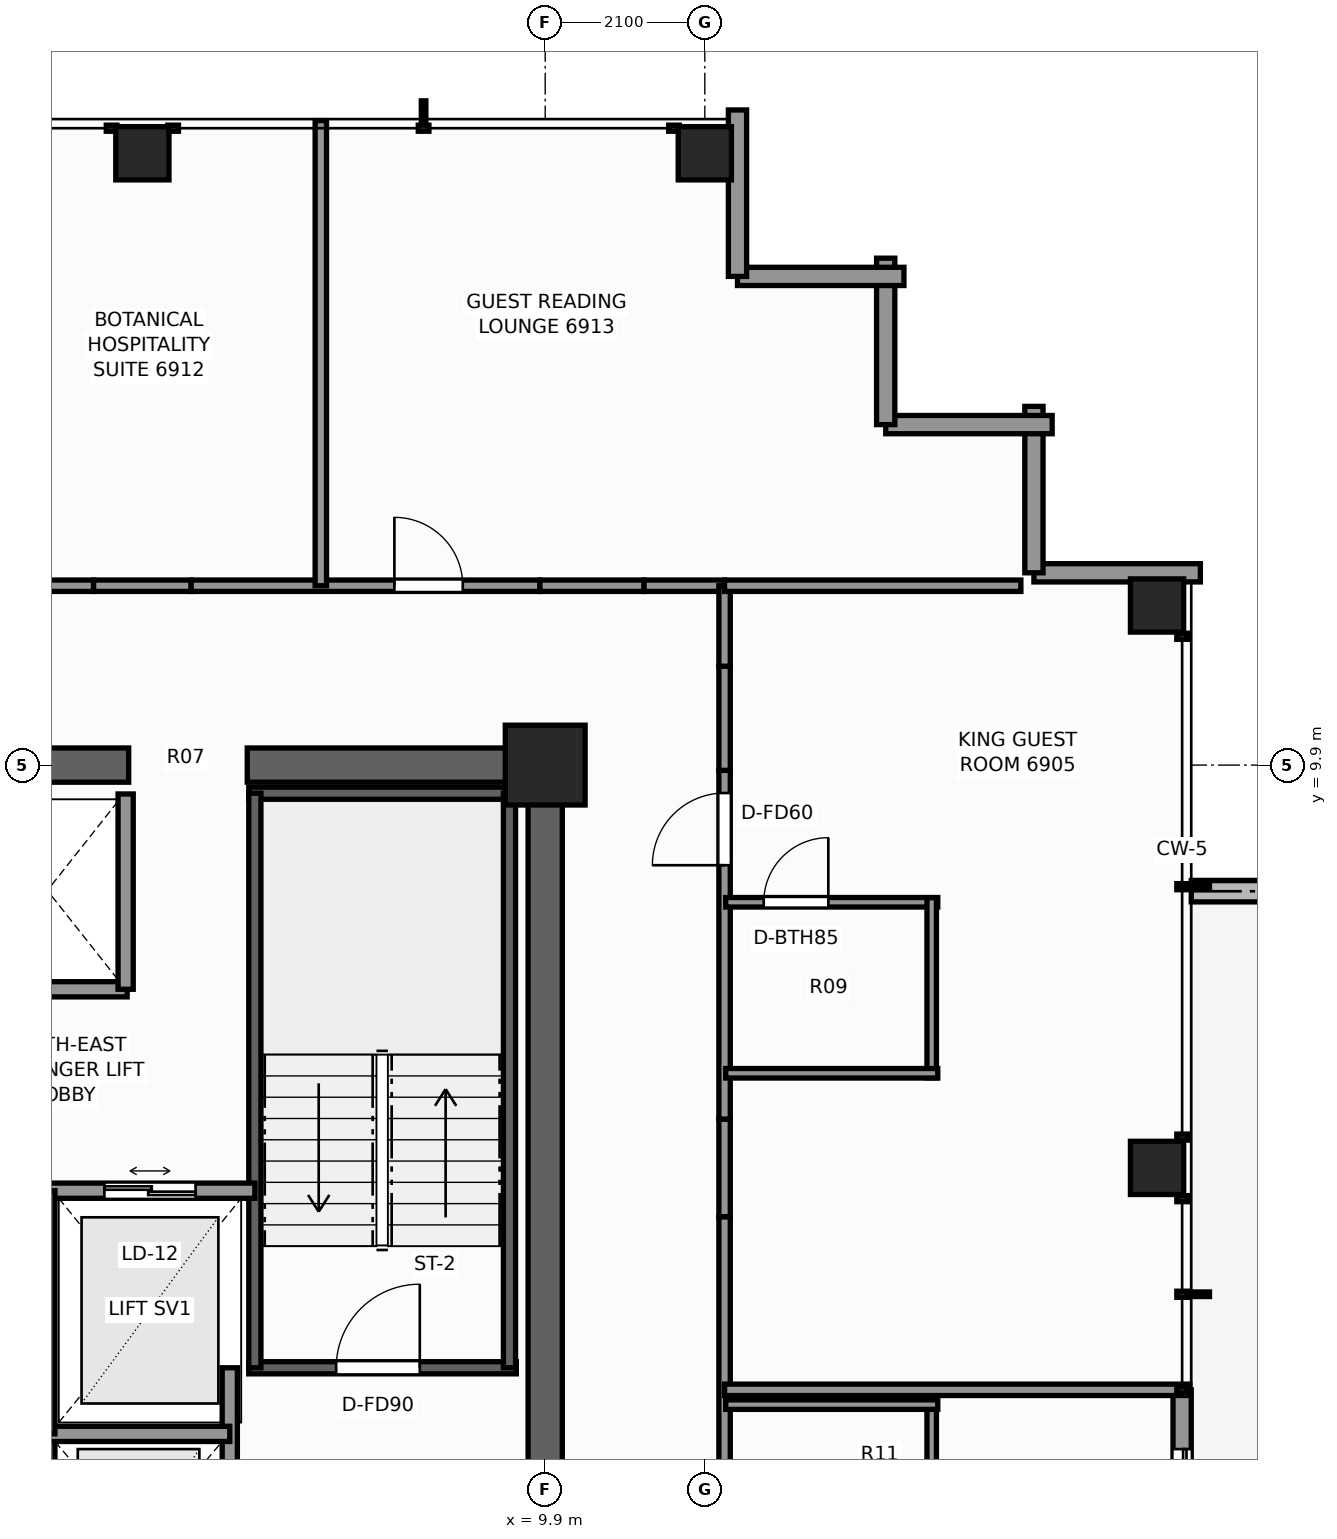
"""IFC4 building model, lengths in metres.
Left out: names, types, materials, properties, quantities, classifications, styles, units other than length and angle.
Written with IfcOpenShell. Run it as: python <this file> out.ifc"""

import sys

from ifc_helpers import new_model, si_unit, direction, frame, frame_2d, origin, origin_2d, place, context, subcontext, project, spatial, rectangle, extrude, element, fill, save


model = new_model("IFC4")
c1 = context("Model", 3, precision=1e-05, world=origin(), true_north=direction((0.0, 1.0)))
c2 = subcontext(c1, "Body", "Model", "MODEL_VIEW")
j1 = project(units=[si_unit("LENGTHUNIT", "METRE"), si_unit("PLANEANGLEUNIT", "RADIAN")], contexts=[c1])
p1 = place(None, origin())
s1 = spatial("IfcSite", under=j1, at=p1, CompositionType="ELEMENT")
p2 = place(p1, origin())
s2 = spatial("IfcBuilding", under=s1, at=p2, CompositionType="ELEMENT")
p3 = place(p2, frame((0.0, 0.0, 237.4)))
s3 = spatial("IfcBuildingStorey", under=s2, at=p3, CompositionType="ELEMENT", Elevation=237.4)
p4 = place(p3, frame((-10.125, 9.9, 0.0), z_axis=(0.0, 0.0, 1.0), x_axis=(1.0, 0.0, 0.0)))
e1 = element("IfcWall", 1, at=p4, inside=s3, PredefinedType="SHEAR", context=c2, shape_type="SweptSolid", body=[
    extrude(rectangle(XDim=14.545, YDim=0.45, at=frame_2d((7.272, 0.0))), origin(), (0.0, 0.0, 1.0), 3.5),
])
p5 = place(p3, frame((5.98, 9.9, 0.0), z_axis=(0.0, 0.0, 1.0), x_axis=(1.0, 0.0, 0.0)))
e2 = element("IfcWall", 2, at=p5, inside=s3, PredefinedType="SHEAR", context=c2, shape_type="SweptSolid", body=[
    extrude(rectangle(XDim=4.145, YDim=0.45, at=frame_2d((2.073, 0.0))), origin(), (0.0, 0.0, 1.0), 3.5),
])
p6 = place(p3, frame((9.9, -3.7, 0.0), z_axis=(0.0, 0.0, 1.0), x_axis=(0.0, 1.0, 0.0)))
e3 = element("IfcWall", 3, at=p6, inside=s3, PredefinedType="SHEAR", context=c2, shape_type="SweptSolid", body=[
    extrude(rectangle(XDim=13.375, YDim=0.45, at=frame_2d((6.688, 0.0))), origin(), (0.0, 0.0, 1.0), 3.5),
])
p7 = place(p6, frame((0.35, 0.0, 0.0)))
e4 = element("IfcOpeningElement", 4, at=p7, cuts=e3, PredefinedType="OPENING", context=c2, shape_type="SweptSolid", body=[
    extrude(rectangle(XDim=1.1, YDim=2.2, at=frame_2d((0.55, 1.1))), frame((0.0, 0.235, 0.0), z_axis=(0.0, -1.0, 0.0), x_axis=(1.0, 0.0, 0.0)), (0.0, 0.0, 1.0), 0.47),
])
p8 = place(p3, frame((9.9, 9.9, 0.0), z_axis=(0.0, 0.0, 1.0), x_axis=(1.0, 0.0, 0.0)))
e5 = element("IfcColumn", 5, at=p8, inside=s3, PredefinedType="COLUMN", context=c2, shape_type="SweptSolid", body=[
    extrude(rectangle(XDim=1.05, YDim=1.05, at=origin_2d()), origin(), (0.0, 0.0, 1.0), 3.5),
])
for number, where, z_axis, x_axis in (
    (6, (4.6, 17.95, 0.0), (0.0, 0.0, 1.0), (1.0, 0.0, 0.0)),
    (7, (12.0, 17.95, 0.0), (0.0, 0.0, 1.0), (1.0, 0.0, 0.0)),
    (8, (17.95, 4.6, 0.0), (0.0, 0.0, 1.0), (1.0, 0.0, 0.0)),
    (9, (17.95, 12.0, 0.0), (0.0, 0.0, 1.0), (1.0, 0.0, 0.0)),
):
    element("IfcColumn", number, at=place(p3, frame(where, z_axis=z_axis, x_axis=x_axis)), inside=s3, PredefinedType="COLUMN", context=c2, shape_type="SweptSolid", body=[
        extrude(rectangle(XDim=0.7, YDim=0.7, at=origin_2d()), origin(), (0.0, 0.0, 1.0), 3.5),
    ])
p9 = place(p3, frame((21.375, 8.24, -0.07), z_axis=(0.0, 0.0, 1.0), x_axis=(-1.0, 0.0, 0.0)))
e10 = element("IfcWall", 10, at=p9, inside=s3, PredefinedType="PARAPET", context=c2, shape_type="SweptSolid", body=[
    extrude(rectangle(XDim=2.975, YDim=0.28, at=frame_2d((1.487, 0.0))), origin(), (0.0, 0.0, 1.0), 0.42),
])
p10 = place(p3, frame((18.28, 1.68, 0.0), z_axis=(0.0, 0.0, 1.0), x_axis=(0.0, -1.0, 0.0)))
e11 = element("IfcWall", 11, at=p10, inside=s3, PredefinedType="STANDARD", context=c2, shape_type="SweptSolid", body=[
    extrude(rectangle(XDim=3.36, YDim=0.24, at=frame_2d((1.68, 0.0))), origin(), (0.0, 0.0, 1.0), 3.25),
])
p11 = place(p10, frame((0.78, 0.0, 0.0)))
e12 = element("IfcOpeningElement", 12, at=p11, cuts=e11, PredefinedType="OPENING", context=c2, shape_type="SweptSolid", body=[
    extrude(rectangle(XDim=1.8, YDim=2.2, at=frame_2d((0.9, 1.1))), frame((0.0, 0.13, 0.0), z_axis=(0.0, -1.0, 0.0), x_axis=(1.0, 0.0, 0.0)), (0.0, 0.0, 1.0), 0.26),
])
p12 = place(p3, frame((16.33, 12.43, 0.0), z_axis=(0.0, 0.0, 1.0), x_axis=(1.0, 0.0, 0.0)))
e13 = element("IfcWall", 13, at=p12, inside=s3, PredefinedType="STANDARD", context=c2, shape_type="SweptSolid", body=[
    extrude(rectangle(XDim=2.19, YDim=0.24, at=frame_2d((1.095, 0.0))), origin(), (0.0, 0.0, 1.0), 1.445),
])
for number, where, z_axis, x_axis in (
    (14, (16.33, 14.62, 0.0), (0.0, 0.0, 1.0), (0.0, -1.0, 0.0)),
    (15, (14.38, 14.38, 0.0), (0.0, 0.0, 1.0), (1.0, 0.0, 0.0)),
    (16, (14.38, 16.57, 0.0), (0.0, 0.0, 1.0), (0.0, -1.0, 0.0)),
    (17, (12.43, 16.33, 0.0), (0.0, 0.0, 1.0), (1.0, 0.0, 0.0)),
):
    element("IfcWall", number, at=place(p3, frame(where, z_axis=z_axis, x_axis=x_axis)), inside=s3, PredefinedType="STANDARD", context=c2, shape_type="SweptSolid", body=[
        extrude(rectangle(XDim=2.19, YDim=0.24, at=frame_2d((1.095, 0.0))), origin(), (0.0, 0.0, 1.0), 2.633),
    ])
p13 = place(p3, frame((12.43, 18.52, 0.0), z_axis=(0.0, 0.0, 1.0), x_axis=(0.0, -1.0, 0.0)))
e18 = element("IfcWall", 18, at=p13, inside=s3, PredefinedType="STANDARD", context=c2, shape_type="SweptSolid", body=[
    extrude(rectangle(XDim=2.19, YDim=0.24, at=frame_2d((1.095, 0.0))), origin(), (0.0, 0.0, 1.0), 1.445),
])
p14 = place(p3, frame((6.0, 1.97, 0.0), z_axis=(0.0, 0.0, 1.0), x_axis=(1.0, 0.0, 0.0)))
e19 = element("IfcWall", 19, at=p14, inside=s3, PredefinedType="SHEAR", context=c2, shape_type="SweptSolid", body=[
    extrude(rectangle(XDim=3.52, YDim=0.16, at=frame_2d((1.76, 0.0))), origin(), (0.0, 0.0, 1.0), 3.5),
])
p15 = place(p14, frame((1.15, 0.0, 0.0)))
e20 = element("IfcOpeningElement", 20, at=p15, cuts=e19, PredefinedType="OPENING", context=c2, shape_type="SweptSolid", body=[
    extrude(rectangle(XDim=1.1, YDim=2.2, at=frame_2d((0.55, 1.1))), frame((0.0, 0.09, 0.0), z_axis=(0.0, -1.0, 0.0), x_axis=(1.0, 0.0, 0.0)), (0.0, 0.0, 1.0), 0.18),
])
p16 = place(p3, frame((6.0, 9.53, 0.0), z_axis=(0.0, 0.0, 1.0), x_axis=(1.0, 0.0, 0.0)))
e21 = element("IfcWall", 21, at=p16, inside=s3, PredefinedType="SHEAR", context=c2, shape_type="SweptSolid", body=[
    extrude(rectangle(XDim=3.52, YDim=0.16, at=frame_2d((1.76, 0.0))), origin(), (0.0, 0.0, 1.0), 3.5),
])
for number, where, z_axis, x_axis in (
    (22, (6.08, 1.97, 0.0), (0.0, 0.0, 1.0), (0.0, 1.0, 0.0)),
    (23, (9.43, 1.97, 0.0), (0.0, 0.0, 1.0), (0.0, 1.0, 0.0)),
):
    element("IfcWall", number, at=place(p3, frame(where, z_axis=z_axis, x_axis=x_axis)), inside=s3, PredefinedType="SHEAR", context=c2, shape_type="SweptSolid", body=[
        extrude(rectangle(XDim=7.56, YDim=0.16, at=frame_2d((3.78, 0.0))), origin(), (0.0, 0.0, 1.0), 3.5),
    ])
p17 = place(p3, frame((5.75, -3.6, 0.0), z_axis=(0.0, 0.0, 1.0), x_axis=(0.0, 1.0, 0.0)))
e24 = element("IfcWall", 24, at=p17, inside=s3, PredefinedType="SOLIDWALL", context=c2, shape_type="SweptSolid", body=[
    extrude(rectangle(XDim=5.57, YDim=0.2, at=frame_2d((2.785, 0.0))), origin(), (0.0, 0.0, 1.0), 3.25),
])
p18 = place(p17, frame((2.75, 0.0, 0.0)))
e25 = element("IfcOpeningElement", 25, at=p18, cuts=e24, PredefinedType="OPENING", context=c2, shape_type="SweptSolid", body=[
    extrude(rectangle(XDim=1.1, YDim=2.2, at=frame_2d((0.55, 1.1))), frame((0.0, 0.11, 0.0), z_axis=(0.0, -1.0, 0.0), x_axis=(1.0, 0.0, 0.0)), (0.0, 0.0, 1.0), 0.22),
])
p19 = place(p3, frame((3.35, -1.7, 0.0), z_axis=(0.0, 0.0, 1.0), x_axis=(0.0, 1.0, 0.0)))
e26 = element("IfcWall", 26, at=p19, inside=s3, PredefinedType="SOLIDWALL", context=c2, shape_type="SweptSolid", body=[
    extrude(rectangle(XDim=2.8, YDim=0.2, at=frame_2d((1.4, 0.0))), origin(), (0.0, 0.0, 1.0), 3.25),
])
p20 = place(p3, frame((3.35, 1.1, 0.0), z_axis=(0.0, 0.0, 1.0), x_axis=(1.0, 0.0, 0.0)))
e27 = element("IfcWall", 27, at=p20, inside=s3, PredefinedType="SOLIDWALL", context=c2, shape_type="SweptSolid", body=[
    extrude(rectangle(XDim=2.4, YDim=0.2, at=frame_2d((1.2, 0.0))), origin(), (0.0, 0.0, 1.0), 3.25),
])
p21 = place(p3, frame((3.35, 4.3, 0.0), z_axis=(0.0, 0.0, 1.0), x_axis=(1.0, 0.0, 0.0)))
e28 = element("IfcWall", 28, at=p21, inside=s3, PredefinedType="SOLIDWALL", context=c2, shape_type="SweptSolid", body=[
    extrude(rectangle(XDim=2.73, YDim=0.2, at=frame_2d((1.365, 0.0))), origin(), (0.0, 0.0, 1.0), 3.25),
])
p22 = place(p21, frame((0.75, 0.0, 0.0)))
e29 = element("IfcOpeningElement", 29, at=p22, cuts=e28, PredefinedType="OPENING", context=c2, shape_type="SweptSolid", body=[
    extrude(rectangle(XDim=1.2, YDim=2.25, at=frame_2d((0.6, 1.125))), frame((0.0, 0.11, 0.0), z_axis=(0.0, -1.0, 0.0), x_axis=(1.0, 0.0, 0.0)), (0.0, 0.0, 1.0), 0.22),
])
p23 = place(p3, frame((0.22, 6.95, 0.0), z_axis=(0.0, 0.0, 1.0), x_axis=(1.0, 0.0, 0.0)))
e30 = element("IfcWall", 30, at=p23, inside=s3, PredefinedType="SOLIDWALL", context=c2, shape_type="SweptSolid", body=[
    extrude(rectangle(XDim=4.18, YDim=0.2, at=frame_2d((2.09, 0.0))), origin(), (0.0, 0.0, 1.0), 3.25),
])
p24 = place(p3, frame((4.38, 6.95, 0.0), z_axis=(0.0, 0.0, 1.0), x_axis=(0.0, 1.0, 0.0)))
e31 = element("IfcWall", 31, at=p24, inside=s3, PredefinedType="SOLIDWALL", context=c2, shape_type="SweptSolid", body=[
    extrude(rectangle(XDim=2.57, YDim=0.2, at=frame_2d((1.285, 0.0))), origin(), (0.0, 0.0, 1.0), 3.25),
])
p25 = place(p3, frame((3.35, 1.1, 0.0), z_axis=(0.0, 0.0, 1.0), x_axis=(0.0, 1.0, 0.0)))
e32 = element("IfcWall", 32, at=p25, inside=s3, PredefinedType="SOLIDWALL", context=c2, shape_type="SweptSolid", body=[
    extrude(rectangle(XDim=3.2, YDim=0.2, at=frame_2d((1.6, 0.0))), origin(), (0.0, 0.0, 1.0), 3.25),
])
p26 = place(p3, frame((-3.958, 12.26, 0.0), z_axis=(0.0, 0.0, 1.0), x_axis=(1.0, 0.0, 0.0)))
e33 = element("IfcWall", 33, at=p26, inside=s3, PredefinedType="PARTITIONING", context=c2, shape_type="SweptSolid", body=[
    extrude(rectangle(XDim=7.916, YDim=0.15, at=frame_2d((3.958, 0.0))), origin(), (0.0, 0.0, 1.0), 2.539),
])
p27 = place(p26, frame((6.317, 0.0, 0.0)))
e34 = element("IfcOpeningElement", 34, at=p27, cuts=e33, PredefinedType="OPENING", context=c2, shape_type="SweptSolid", body=[
    extrude(rectangle(XDim=0.95, YDim=2.06, at=frame_2d((0.475, 1.03))), frame((0.0, 0.085, 0.0), z_axis=(0.0, -1.0, 0.0), x_axis=(1.0, 0.0, 0.0)), (0.0, 0.0, 1.0), 0.17),
])
p28 = place(p3, frame((3.958, 12.26, 0.0), z_axis=(0.0, 0.0, 1.0), x_axis=(1.0, 0.0, 0.0)))
e35 = element("IfcWall", 35, at=p28, inside=s3, PredefinedType="PARTITIONING", context=c2, shape_type="SweptSolid", body=[
    extrude(rectangle(XDim=1.284, YDim=0.15, at=frame_2d((0.642, 0.0))), origin(), (0.0, 0.0, 1.0), 1.435),
])
p29 = place(p3, frame((5.242, 12.26, 0.0), z_axis=(0.0, 0.0, 1.0), x_axis=(1.0, 0.0, 0.0)))
e36 = element("IfcWall", 36, at=p29, inside=s3, PredefinedType="PARTITIONING", context=c2, shape_type="SweptSolid", body=[
    extrude(rectangle(XDim=4.589, YDim=0.15, at=frame_2d((2.294, 0.0))), origin(), (0.0, 0.0, 1.0), 3.25),
])
p30 = place(p29, frame((2.674, 0.0, 0.0)))
e37 = element("IfcOpeningElement", 37, at=p30, cuts=e36, PredefinedType="OPENING", context=c2, shape_type="SweptSolid", body=[
    extrude(rectangle(XDim=0.9, YDim=2.06, at=frame_2d((0.45, 1.03))), frame((0.0, 0.085, 0.0), z_axis=(0.0, -1.0, 0.0), x_axis=(1.0, 0.0, 0.0)), (0.0, 0.0, 1.0), 0.17),
])
p31 = place(p3, frame((9.831, 12.26, 0.0), z_axis=(0.0, 0.0, 1.0), x_axis=(1.0, 0.0, 0.0)))
e38 = element("IfcWall", 38, at=p31, inside=s3, PredefinedType="PARTITIONING", context=c2, shape_type="SweptSolid", body=[
    extrude(rectangle(XDim=1.37, YDim=0.15, at=frame_2d((0.685, 0.0))), origin(), (0.0, 0.0, 1.0), 1.435),
])
p32 = place(p3, frame((11.201, 12.26, 0.0), z_axis=(0.0, 0.0, 1.0), x_axis=(1.0, 0.0, 0.0)))
e39 = element("IfcWall", 39, at=p32, inside=s3, PredefinedType="PARTITIONING", context=c2, shape_type="SweptSolid", body=[
    extrude(rectangle(XDim=1.059, YDim=0.15, at=frame_2d((0.53, 0.0))), origin(), (0.0, 0.0, 1.0), 3.25),
])
p33 = place(p3, frame((12.26, -3.958, 0.0), z_axis=(0.0, 0.0, 1.0), x_axis=(0.0, 1.0, 0.0)))
e40 = element("IfcWall", 40, at=p33, inside=s3, PredefinedType="PARTITIONING", context=c2, shape_type="SweptSolid", body=[
    extrude(rectangle(XDim=7.916, YDim=0.15, at=frame_2d((3.958, 0.0))), origin(), (0.0, 0.0, 1.0), 2.775),
])
p34 = place(p3, frame((12.26, 3.958, 0.0), z_axis=(0.0, 0.0, 1.0), x_axis=(0.0, 1.0, 0.0)))
e41 = element("IfcWall", 41, at=p34, inside=s3, PredefinedType="PARTITIONING", context=c2, shape_type="SweptSolid", body=[
    extrude(rectangle(XDim=1.284, YDim=0.15, at=frame_2d((0.642, 0.0))), origin(), (0.0, 0.0, 1.0), 1.435),
])
p35 = place(p3, frame((12.26, 5.242, 0.0), z_axis=(0.0, 0.0, 1.0), x_axis=(0.0, 1.0, 0.0)))
e42 = element("IfcWall", 42, at=p35, inside=s3, PredefinedType="PARTITIONING", context=c2, shape_type="SweptSolid", body=[
    extrude(rectangle(XDim=4.589, YDim=0.15, at=frame_2d((2.294, 0.0))), origin(), (0.0, 0.0, 1.0), 3.25),
])
p36 = place(p35, frame((3.341, 0.0, 0.0)))
e43 = element("IfcOpeningElement", 43, at=p36, cuts=e42, PredefinedType="OPENING", context=c2, shape_type="SweptSolid", body=[
    extrude(rectangle(XDim=0.95, YDim=2.06, at=frame_2d((0.475, 1.03))), frame((0.0, 0.085, 0.0), z_axis=(0.0, -1.0, 0.0), x_axis=(1.0, 0.0, 0.0)), (0.0, 0.0, 1.0), 0.17),
])
p37 = place(p3, frame((12.26, 9.831, 0.0), z_axis=(0.0, 0.0, 1.0), x_axis=(0.0, 1.0, 0.0)))
e44 = element("IfcWall", 44, at=p37, inside=s3, PredefinedType="PARTITIONING", context=c2, shape_type="SweptSolid", body=[
    extrude(rectangle(XDim=1.37, YDim=0.15, at=frame_2d((0.685, 0.0))), origin(), (0.0, 0.0, 1.0), 1.435),
])
p38 = place(p3, frame((12.26, 11.201, 0.0), z_axis=(0.0, 0.0, 1.0), x_axis=(0.0, 1.0, 0.0)))
e45 = element("IfcWall", 45, at=p38, inside=s3, PredefinedType="PARTITIONING", context=c2, shape_type="SweptSolid", body=[
    extrude(rectangle(XDim=1.059, YDim=0.15, at=frame_2d((0.53, 0.0))), origin(), (0.0, 0.0, 1.0), 3.25),
])
p39 = place(p3, frame((12.26, 12.26, 0.0), z_axis=(0.0, 0.0, 1.0), x_axis=(1.0, 0.0, 0.0)))
e46 = element("IfcWall", 46, at=p39, inside=s3, PredefinedType="PARTITIONING", context=c2, shape_type="SweptSolid", body=[
    extrude(rectangle(XDim=3.898, YDim=0.15, at=frame_2d((1.949, 0.0))), origin(), (0.0, 0.0, 1.0), 3.25),
])
p40 = place(p3, frame((12.26, 1.68, 0.0), z_axis=(0.0, 0.0, 1.0), x_axis=(1.0, 0.0, 0.0)))
e47 = element("IfcWall", 47, at=p40, inside=s3, PredefinedType="PARTITIONING", context=c2, shape_type="SweptSolid", body=[
    extrude(rectangle(XDim=6.12, YDim=0.15, at=frame_2d((3.06, 0.0))), origin(), (0.0, 0.0, 1.0), 2.623),
])
p41 = place(p3, frame((14.985, -0.825, 0.0), z_axis=(0.0, 0.0, 1.0), x_axis=(0.0, 1.0, 0.0)))
e48 = element("IfcWall", 48, at=p41, inside=s3, PredefinedType="PARTITIONING", context=c2, shape_type="SweptSolid", body=[
    extrude(rectangle(XDim=2.37, YDim=0.125, at=frame_2d((1.185, 0.0))), origin(), (0.0, 0.0, 1.0), 2.775),
])
p42 = place(p3, frame((12.275, 1.485, 0.0), z_axis=(0.0, 0.0, 1.0), x_axis=(1.0, 0.0, 0.0)))
e49 = element("IfcWall", 49, at=p42, inside=s3, PredefinedType="PARTITIONING", context=c2, shape_type="SweptSolid", body=[
    extrude(rectangle(XDim=2.79, YDim=0.125, at=frame_2d((1.395, 0.0))), origin(), (0.0, 0.0, 1.0), 3.25),
])
p43 = place(p3, frame((12.275, 8.095, 0.0), z_axis=(0.0, 0.0, 1.0), x_axis=(1.0, 0.0, 0.0)))
e50 = element("IfcWall", 50, at=p43, inside=s3, PredefinedType="PARTITIONING", context=c2, shape_type="SweptSolid", body=[
    extrude(rectangle(XDim=2.79, YDim=0.125, at=frame_2d((1.395, 0.0))), origin(), (0.0, 0.0, 1.0), 3.25),
])
p44 = place(p43, frame((0.5, 0.0, 0.0)))
e51 = element("IfcOpeningElement", 51, at=p44, cuts=e50, PredefinedType="OPENING", context=c2, shape_type="SweptSolid", body=[
    extrude(rectangle(XDim=0.85, YDim=2.03, at=frame_2d((0.425, 1.015))), frame((0.0, 0.073, 0.0), z_axis=(0.0, -1.0, 0.0), x_axis=(1.0, 0.0, 0.0)), (0.0, 0.0, 1.0), 0.145),
])
p45 = place(p3, frame((14.985, 5.785, 0.0), z_axis=(0.0, 0.0, 1.0), x_axis=(0.0, 1.0, 0.0)))
e52 = element("IfcWall", 52, at=p45, inside=s3, PredefinedType="PARTITIONING", context=c2, shape_type="SweptSolid", body=[
    extrude(rectangle(XDim=2.37, YDim=0.125, at=frame_2d((1.185, 0.0))), origin(), (0.0, 0.0, 1.0), 3.25),
])
p46 = place(p3, frame((12.275, 5.845, 0.0), z_axis=(0.0, 0.0, 1.0), x_axis=(1.0, 0.0, 0.0)))
e53 = element("IfcWall", 53, at=p46, inside=s3, PredefinedType="PARTITIONING", context=c2, shape_type="SweptSolid", body=[
    extrude(rectangle(XDim=2.79, YDim=0.125, at=frame_2d((1.395, 0.0))), origin(), (0.0, 0.0, 1.0), 3.25),
])
p47 = place(p3, frame((6.948, 12.26, 0.0), z_axis=(0.0, 0.0, 1.0), x_axis=(0.0, 1.0, 0.0)))
e54 = element("IfcWall", 54, at=p47, inside=s3, PredefinedType="PARTITIONING", context=c2, shape_type="SweptSolid", body=[
    extrude(rectangle(XDim=6.12, YDim=0.15, at=frame_2d((3.06, 0.0))), origin(), (0.0, 0.0, 1.0), 2.623),
])
p48 = place(p11, origin())
e55 = element("IfcDoor", 55, at=p48, inside=s3, OperationType="DOUBLE_DOOR_SLIDING", PredefinedType="DOOR", context=c2, shape_type="SweptSolid", body=[
    extrude(rectangle(XDim=1.8, YDim=2.2, at=frame_2d((0.9, 1.1))), frame((0.0, 0.025, 0.0), z_axis=(0.0, -1.0, 0.0), x_axis=(1.0, 0.0, 0.0)), (0.0, 0.0, 1.0), 0.05),
])
fill(e12, e55)
p49 = place(p15, origin())
e56 = element("IfcDoor", 56, at=p49, inside=s3, OperationType="SINGLE_SWING_RIGHT", PredefinedType="DOOR", context=c2, shape_type="SweptSolid", body=[
    extrude(rectangle(XDim=1.1, YDim=2.2, at=frame_2d((0.55, 1.1))), frame((0.0, 0.025, 0.0), z_axis=(0.0, -1.0, 0.0), x_axis=(1.0, 0.0, 0.0)), (0.0, 0.0, 1.0), 0.05),
])
fill(e20, e56)
p50 = place(p22, origin())
e57 = element("IfcDoor", 57, at=p50, inside=s3, OperationType="DOUBLE_DOOR_SLIDING", PredefinedType="DOOR", context=c2, shape_type="SweptSolid", body=[
    extrude(rectangle(XDim=1.2, YDim=2.25, at=frame_2d((0.6, 1.125))), frame((0.0, 0.025, 0.0), z_axis=(0.0, -1.0, 0.0), x_axis=(1.0, 0.0, 0.0)), (0.0, 0.0, 1.0), 0.05),
])
fill(e29, e57)
p51 = place(p44, origin())
e58 = element("IfcDoor", 58, at=p51, inside=s3, OperationType="SINGLE_SWING_RIGHT", PredefinedType="DOOR", context=c2, shape_type="SweptSolid", body=[
    extrude(rectangle(XDim=0.85, YDim=2.03, at=frame_2d((0.425, 1.015))), frame((0.0, 0.025, 0.0), z_axis=(0.0, -1.0, 0.0), x_axis=(1.0, 0.0, 0.0)), (0.0, 0.0, 1.0), 0.05),
])
fill(e51, e58)
p52 = place(p36, origin())
e59 = element("IfcDoor", 59, at=p52, inside=s3, OperationType="SINGLE_SWING_LEFT", PredefinedType="DOOR", context=c2, shape_type="SweptSolid", body=[
    extrude(rectangle(XDim=0.95, YDim=2.06, at=frame_2d((0.475, 1.03))), frame((0.0, 0.025, 0.0), z_axis=(0.0, -1.0, 0.0), x_axis=(1.0, 0.0, 0.0)), (0.0, 0.0, 1.0), 0.05),
])
fill(e43, e59)
p53 = place(p30, origin())
e60 = element("IfcDoor", 60, at=p53, inside=s3, OperationType="SINGLE_SWING_LEFT", PredefinedType="DOOR", context=c2, shape_type="SweptSolid", body=[
    extrude(rectangle(XDim=0.9, YDim=2.06, at=frame_2d((0.45, 1.03))), frame((0.0, 0.025, 0.0), z_axis=(0.0, -1.0, 0.0), x_axis=(1.0, 0.0, 0.0)), (0.0, 0.0, 1.0), 0.05),
])
fill(e37, e60)
save(model, sys.argv[1])
